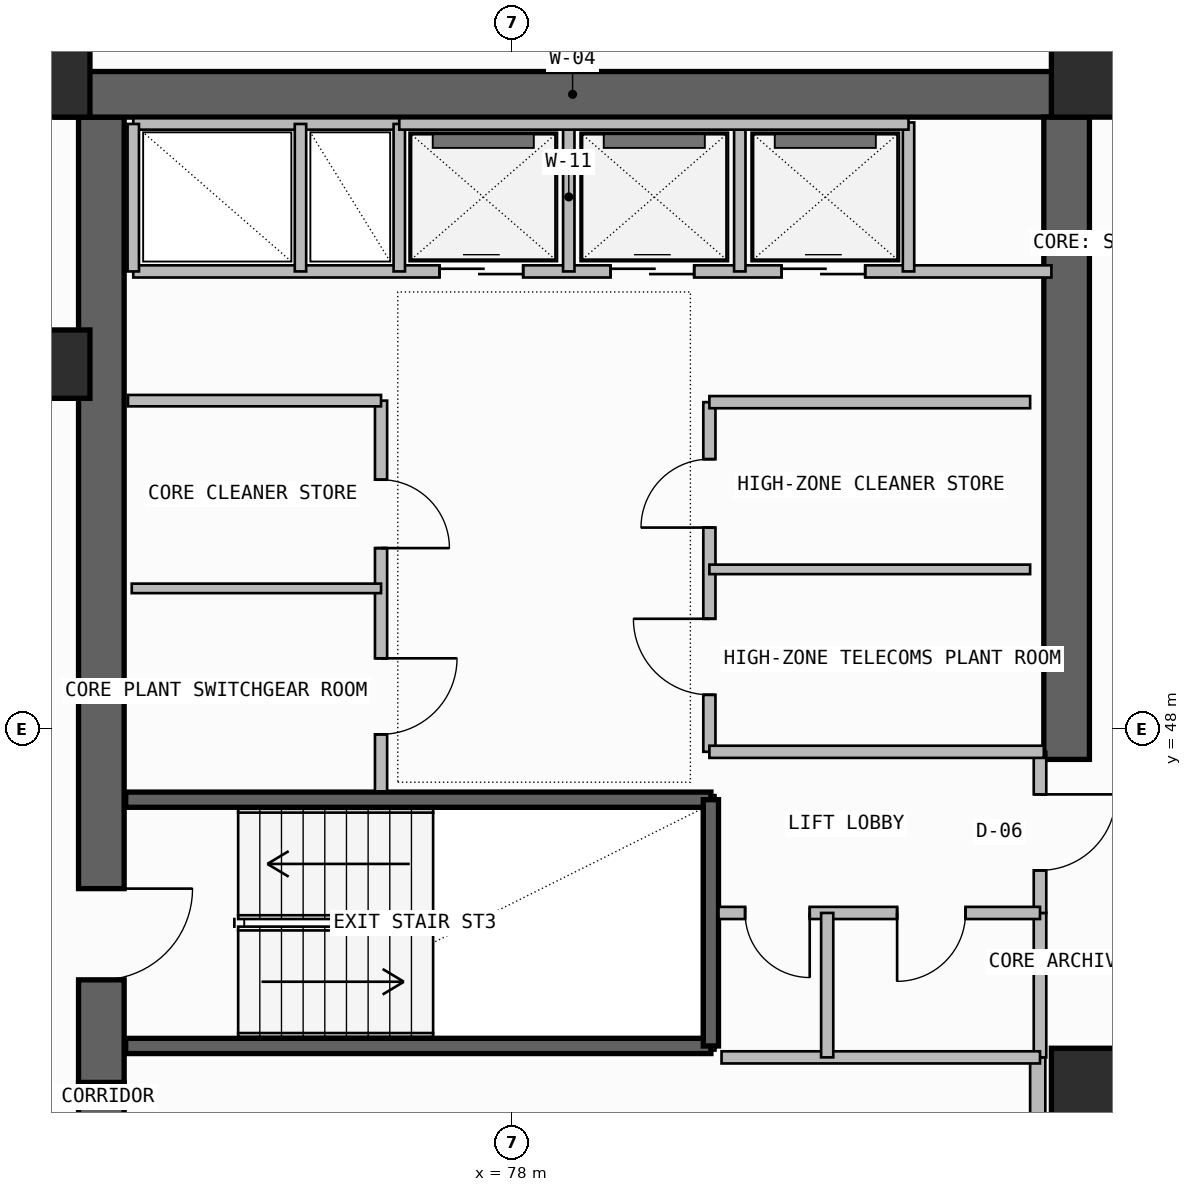
"""IFC4 building model, lengths in metres.
Left out: names, types, materials, properties, quantities, classifications, styles, units other than length and angle.
Written with IfcOpenShell. Run it as: python <this file> out.ifc"""

import sys

from ifc_helpers import new_model, si_unit, direction, frame, frame_2d, origin, origin_2d, place, context, subcontext, project, spatial, rectangle, extrude, element, fill, save


model = new_model("IFC4")
c1 = context("Model", 3, precision=1e-05, world=origin(), true_north=direction((0.0, 1.0)))
c2 = subcontext(c1, "Body", "Model", "MODEL_VIEW")
j1 = project(units=[si_unit("LENGTHUNIT", "METRE"), si_unit("PLANEANGLEUNIT", "RADIAN")], contexts=[c1])
p1 = place(None, origin())
s1 = spatial("IfcSite", under=j1, at=p1, CompositionType="ELEMENT")
p2 = place(p1, origin())
s2 = spatial("IfcBuilding", under=s1, at=p2, CompositionType="ELEMENT")
p3 = place(p2, frame((0.0, 0.0, 236.1)))
s3 = spatial("IfcBuildingStorey", under=s2, at=p3, CompositionType="ELEMENT", Elevation=236.1)
p4 = place(p3, frame((72.6, 35.5, -0.26), z_axis=(0.0, 0.0, 1.0), x_axis=(0.0, 1.0, 0.0)))
e1 = element("IfcWall", 1, at=p4, inside=s3, PredefinedType="SHEAR", context=c2, shape_type="SweptSolid", body=[
    extrude(rectangle(XDim=7.85, YDim=0.6, at=frame_2d((3.925, 0.0))), origin(), (0.0, 0.0, 1.0), 3.52),
])
p5 = place(p4, frame((1.45, 0.0, 0.26)))
e2 = element("IfcOpeningElement", 2, at=p5, cuts=e1, PredefinedType="OPENING", context=c2, shape_type="SweptSolid", body=[
    extrude(rectangle(XDim=1.2, YDim=2.2, at=frame_2d((0.6, 1.1))), frame((0.0, 0.31, 0.0), z_axis=(0.0, -1.0, 0.0), x_axis=(1.0, 0.0, 0.0)), (0.0, 0.0, 1.0), 0.62),
])
p6 = place(p3, frame((72.6, 43.35, -0.26), z_axis=(0.0, 0.0, 1.0), x_axis=(0.0, 1.0, 0.0)))
e3 = element("IfcWall", 3, at=p6, inside=s3, PredefinedType="SHEAR", context=c2, shape_type="SweptSolid", body=[
    extrude(rectangle(XDim=12.7, YDim=0.6, at=frame_2d((6.35, 0.0))), origin(), (0.0, 0.0, 1.0), 3.52),
])
p7 = place(p6, frame((1.35, 0.0, 0.26)))
e4 = element("IfcOpeningElement", 4, at=p7, cuts=e3, PredefinedType="OPENING", context=c2, shape_type="SweptSolid", body=[
    extrude(rectangle(XDim=1.2, YDim=2.2, at=frame_2d((0.6, 1.1))), frame((0.0, 0.31, 0.0), z_axis=(0.0, -1.0, 0.0), x_axis=(1.0, 0.0, 0.0)), (0.0, 0.0, 1.0), 0.62),
])
p8 = place(p3, frame((72.0, 56.35, -0.26), z_axis=(0.0, 0.0, 1.0), x_axis=(1.0, 0.0, 0.0)))
e5 = element("IfcWall", 5, at=p8, inside=s3, PredefinedType="SHEAR", context=c2, shape_type="SweptSolid", body=[
    extrude(rectangle(XDim=13.6, YDim=0.6, at=frame_2d((6.8, 0.0))), origin(), (0.0, 0.0, 1.0), 3.52),
])
p9 = place(p3, frame((85.3, 47.6, -0.26), z_axis=(0.0, 0.0, 1.0), x_axis=(0.0, 1.0, 0.0)))
e6 = element("IfcWall", 6, at=p9, inside=s3, PredefinedType="SHEAR", context=c2, shape_type="SweptSolid", body=[
    extrude(rectangle(XDim=8.45, YDim=0.6, at=frame_2d((4.225, 0.0))), origin(), (0.0, 0.0, 1.0), 3.52),
])
for number, where, z_axis, x_axis in (
    (7, (85.55, 43.35, 0.0), (0.0, 0.0, 1.0), (1.0, 0.0, 0.0)),
    (8, (72.0, 52.8, 0.0), (0.0, 0.0, 1.0), (1.0, 0.0, 0.0)),
    (9, (72.0, 56.5, 0.0), (0.0, 0.0, 1.0), (1.0, 0.0, 0.0)),
    (10, (85.55, 56.5, 0.0), (0.0, 0.0, 1.0), (1.0, 0.0, 0.0)),
):
    element("IfcColumn", number, at=place(p3, frame(where, z_axis=z_axis, x_axis=x_axis)), inside=s3, PredefinedType="COLUMN", context=c2, shape_type="SweptSolid", body=[
        extrude(rectangle(XDim=0.9, YDim=0.9, at=origin_2d()), origin(), (0.0, 0.0, 1.0), 3.52),
    ])
p10 = place(p3, frame((84.92, 38.85, 0.0), z_axis=(0.0, 0.0, 1.0), x_axis=(0.0, 1.0, 0.0)))
e11 = element("IfcWall", 11, at=p10, inside=s3, PredefinedType="SOLIDWALL", context=c2, shape_type="SweptSolid", body=[
    extrude(rectangle(XDim=4.83, YDim=0.2, at=frame_2d((2.415, 0.0))), origin(), (0.0, 0.0, 1.0), 3.26),
])
p11 = place(p10, frame((1.25, 0.0, 0.0)))
e12 = element("IfcOpeningElement", 12, at=p11, cuts=e11, PredefinedType="OPENING", context=c2, shape_type="SweptSolid", body=[
    extrude(rectangle(XDim=1.1, YDim=2.2, at=frame_2d((0.55, 1.1))), frame((0.0, 0.11, 0.0), z_axis=(0.0, -1.0, 0.0), x_axis=(1.0, 0.0, 0.0)), (0.0, 0.0, 1.0), 0.22),
])
for number, where, z_axis, x_axis in (
    (13, (72.92, 43.83, -0.26), (0.0, 0.0, 1.0), (1.0, 0.0, 0.0)),
    (14, (72.92, 47.07, -0.26), (0.0, 0.0, 1.0), (1.0, 0.0, 0.0)),
):
    element("IfcWall", number, at=place(p3, frame(where, z_axis=z_axis, x_axis=x_axis)), inside=s3, PredefinedType="SOLIDWALL", context=c2, shape_type="SweptSolid", body=[
        extrude(rectangle(XDim=7.7, YDim=0.2, at=frame_2d((3.85, 0.0))), origin(), (0.0, 0.0, 1.0), 3.52),
    ])
p12 = place(p3, frame((80.62, 43.83, -0.26), z_axis=(0.0, 0.0, 1.0), x_axis=(0.0, 1.0, 0.0)))
e15 = element("IfcWall", 15, at=p12, inside=s3, PredefinedType="SOLIDWALL", context=c2, shape_type="SweptSolid", body=[
    extrude(rectangle(XDim=3.24, YDim=0.2, at=frame_2d((1.62, 0.0))), origin(), (0.0, 0.0, 1.0), 3.52),
])
p13 = place(p3, frame((84.95, 43.68, 0.0), z_axis=(0.0, 0.0, 1.0), x_axis=(0.0, 1.0, 0.0)))
e16 = element("IfcWall", 16, at=p13, inside=s3, PredefinedType="PLUMBINGWALL", context=c2, shape_type="SweptSolid", body=[
    extrude(rectangle(XDim=1.9, YDim=0.165, at=frame_2d((0.95, 0.0))), origin(), (0.0, 0.0, 1.0), 3.26),
])
p14 = place(p3, frame((84.95, 45.58, 0.0), z_axis=(0.0, 0.0, 1.0), x_axis=(0.0, 1.0, 0.0)))
e17 = element("IfcWall", 17, at=p14, inside=s3, PredefinedType="PARTITIONING", context=c2, shape_type="SweptSolid", body=[
    extrude(rectangle(XDim=2.12, YDim=0.165, at=frame_2d((1.06, 0.0))), origin(), (0.0, 0.0, 1.0), 3.26),
])
p15 = place(p14, frame((0.56, 0.0, 0.0)))
e18 = element("IfcOpeningElement", 18, at=p15, cuts=e17, PredefinedType="OPENING", context=c2, shape_type="SweptSolid", body=[
    extrude(rectangle(XDim=1.0, YDim=2.2, at=frame_2d((0.5, 1.1))), frame((0.0, 0.093, 0.0), z_axis=(0.0, -1.0, 0.0), x_axis=(1.0, 0.0, 0.0)), (0.0, 0.0, 1.0), 0.185),
])
p16 = place(p3, frame((80.72, 45.58, 0.0), z_axis=(0.0, 0.0, 1.0), x_axis=(1.0, 0.0, 0.0)))
e19 = element("IfcWall", 19, at=p16, inside=s3, PredefinedType="PLUMBINGWALL", context=c2, shape_type="SweptSolid", body=[
    extrude(rectangle(XDim=4.23, YDim=0.16, at=frame_2d((2.115, 0.0))), origin(), (0.0, 0.0, 1.0), 3.26),
])
p17 = place(p16, frame((0.35, 0.0, 0.0)))
e20 = element("IfcOpeningElement", 20, at=p17, cuts=e19, PredefinedType="OPENING", context=c2, shape_type="SweptSolid", body=[
    extrude(rectangle(XDim=0.85, YDim=2.05, at=frame_2d((0.425, 1.025))), frame((0.0, 0.09, 0.0), z_axis=(0.0, -1.0, 0.0), x_axis=(1.0, 0.0, 0.0)), (0.0, 0.0, 1.0), 0.18),
])
p18 = place(p16, frame((2.35, 0.0, 0.0)))
e21 = element("IfcOpeningElement", 21, at=p18, cuts=e19, PredefinedType="OPENING", context=c2, shape_type="SweptSolid", body=[
    extrude(rectangle(XDim=0.9, YDim=2.1, at=frame_2d((0.45, 1.05))), frame((0.0, 0.09, 0.0), z_axis=(0.0, -1.0, 0.0), x_axis=(1.0, 0.0, 0.0)), (0.0, 0.0, 1.0), 0.18),
])
p19 = place(p3, frame((80.76, 43.68, 0.0), z_axis=(0.0, 0.0, 1.0), x_axis=(1.0, 0.0, 0.0)))
e22 = element("IfcWall", 22, at=p19, inside=s3, PredefinedType="PLUMBINGWALL", context=c2, shape_type="SweptSolid", body=[
    extrude(rectangle(XDim=4.19, YDim=0.16, at=frame_2d((2.095, 0.0))), origin(), (0.0, 0.0, 1.0), 3.26),
])
p20 = place(p3, frame((82.15, 43.68, 0.0), z_axis=(0.0, 0.0, 1.0), x_axis=(0.0, 1.0, 0.0)))
e23 = element("IfcWall", 23, at=p20, inside=s3, PredefinedType="PLUMBINGWALL", context=c2, shape_type="SweptSolid", body=[
    extrude(rectangle(XDim=1.9, YDim=0.16, at=frame_2d((0.95, 0.0))), origin(), (0.0, 0.0, 1.0), 3.26),
])
p21 = place(p3, frame((76.28, 47.18, 0.0), z_axis=(0.0, 0.0, 1.0), x_axis=(0.0, 1.0, 0.0)))
e24 = element("IfcWall", 24, at=p21, inside=s3, PredefinedType="SOLIDWALL", context=c2, shape_type="SweptSolid", body=[
    extrude(rectangle(XDim=5.14, YDim=0.16, at=frame_2d((2.57, 0.0))), origin(), (0.0, 0.0, 1.0), 3.26),
])
p22 = place(p21, frame((0.75, 0.0, 0.0)))
e25 = element("IfcOpeningElement", 25, at=p22, cuts=e24, PredefinedType="OPENING", context=c2, shape_type="SweptSolid", body=[
    extrude(rectangle(XDim=1.0, YDim=2.2, at=frame_2d((0.5, 1.1))), frame((0.0, 0.09, 0.0), z_axis=(0.0, -1.0, 0.0), x_axis=(1.0, 0.0, 0.0)), (0.0, 0.0, 1.0), 0.18),
])
p23 = place(p21, frame((3.2, 0.0, 0.0)))
e26 = element("IfcOpeningElement", 26, at=p23, cuts=e24, PredefinedType="OPENING", context=c2, shape_type="SweptSolid", body=[
    extrude(rectangle(XDim=0.9, YDim=2.1, at=frame_2d((0.45, 1.05))), frame((0.0, 0.09, 0.0), z_axis=(0.0, -1.0, 0.0), x_axis=(1.0, 0.0, 0.0)), (0.0, 0.0, 1.0), 0.18),
])
p24 = place(p3, frame((72.95, 52.32, 0.0), z_axis=(0.0, 0.0, 1.0), x_axis=(1.0, 0.0, 0.0)))
e27 = element("IfcWall", 27, at=p24, inside=s3, PredefinedType="SOLIDWALL", context=c2, shape_type="SweptSolid", body=[
    extrude(rectangle(XDim=3.33, YDim=0.15, at=frame_2d((1.665, 0.0))), origin(), (0.0, 0.0, 1.0), 3.26),
])
p25 = place(p3, frame((73.0, 49.85, 0.0), z_axis=(0.0, 0.0, 1.0), x_axis=(1.0, 0.0, 0.0)))
e28 = element("IfcWall", 28, at=p25, inside=s3, PredefinedType="PARTITIONING", context=c2, shape_type="SweptSolid", body=[
    extrude(rectangle(XDim=3.28, YDim=0.125, at=frame_2d((1.64, 0.0))), origin(), (0.0, 0.0, 1.0), 3.26),
])
p26 = place(p3, frame((80.6, 47.7, 0.0), z_axis=(0.0, 0.0, 1.0), x_axis=(0.0, 1.0, 0.0)))
e29 = element("IfcWall", 29, at=p26, inside=s3, PredefinedType="SOLIDWALL", context=c2, shape_type="SweptSolid", body=[
    extrude(rectangle(XDim=4.6, YDim=0.16, at=frame_2d((2.3, 0.0))), origin(), (0.0, 0.0, 1.0), 3.26),
])
p27 = place(p26, frame((0.75, 0.0, 0.0)))
e30 = element("IfcOpeningElement", 30, at=p27, cuts=e29, PredefinedType="OPENING", context=c2, shape_type="SweptSolid", body=[
    extrude(rectangle(XDim=1.0, YDim=2.2, at=frame_2d((0.5, 1.1))), frame((0.0, 0.09, 0.0), z_axis=(0.0, -1.0, 0.0), x_axis=(1.0, 0.0, 0.0)), (0.0, 0.0, 1.0), 0.18),
])
p28 = place(p26, frame((2.95, 0.0, 0.0)))
e31 = element("IfcOpeningElement", 31, at=p28, cuts=e29, PredefinedType="OPENING", context=c2, shape_type="SweptSolid", body=[
    extrude(rectangle(XDim=0.9, YDim=2.1, at=frame_2d((0.45, 1.05))), frame((0.0, 0.09, 0.0), z_axis=(0.0, -1.0, 0.0), x_axis=(1.0, 0.0, 0.0)), (0.0, 0.0, 1.0), 0.18),
])
p29 = place(p3, frame((80.6, 47.7, 0.0), z_axis=(0.0, 0.0, 1.0), x_axis=(1.0, 0.0, 0.0)))
e32 = element("IfcWall", 32, at=p29, inside=s3, PredefinedType="SOLIDWALL", context=c2, shape_type="SweptSolid", body=[
    extrude(rectangle(XDim=4.4, YDim=0.16, at=frame_2d((2.2, 0.0))), origin(), (0.0, 0.0, 1.0), 3.26),
])
p30 = place(p3, frame((80.6, 52.3, 0.0), z_axis=(0.0, 0.0, 1.0), x_axis=(1.0, 0.0, 0.0)))
e33 = element("IfcWall", 33, at=p30, inside=s3, PredefinedType="SOLIDWALL", context=c2, shape_type="SweptSolid", body=[
    extrude(rectangle(XDim=4.22, YDim=0.16, at=frame_2d((2.11, 0.0))), origin(), (0.0, 0.0, 1.0), 3.26),
])
p31 = place(p3, frame((80.6, 50.1, 0.0), z_axis=(0.0, 0.0, 1.0), x_axis=(1.0, 0.0, 0.0)))
e34 = element("IfcWall", 34, at=p31, inside=s3, PredefinedType="PARTITIONING", context=c2, shape_type="SweptSolid", body=[
    extrude(rectangle(XDim=4.22, YDim=0.125, at=frame_2d((2.11, 0.0))), origin(), (0.0, 0.0, 1.0), 3.26),
])
p32 = place(p3, frame((73.02, 54.02, 0.0), z_axis=(0.0, 0.0, 1.0), x_axis=(1.0, 0.0, 0.0)))
e35 = element("IfcWall", 35, at=p32, inside=s3, PredefinedType="SOLIDWALL", context=c2, shape_type="SweptSolid", body=[
    extrude(rectangle(XDim=12.08, YDim=0.16, at=frame_2d((6.04, 0.0))), origin(), (0.0, 0.0, 1.0), 3.26),
])
p33 = place(p32, frame((4.03, 0.0, 0.0)))
e36 = element("IfcOpeningElement", 36, at=p33, cuts=e35, PredefinedType="OPENING", context=c2, shape_type="SweptSolid", body=[
    extrude(rectangle(XDim=1.1, YDim=2.25, at=frame_2d((0.55, 1.125))), frame((0.0, 0.09, 0.0), z_axis=(0.0, -1.0, 0.0), x_axis=(1.0, 0.0, 0.0)), (0.0, 0.0, 1.0), 0.18),
])
p34 = place(p32, frame((6.28, 0.0, 0.0)))
e37 = element("IfcOpeningElement", 37, at=p34, cuts=e35, PredefinedType="OPENING", context=c2, shape_type="SweptSolid", body=[
    extrude(rectangle(XDim=1.1, YDim=2.25, at=frame_2d((0.55, 1.125))), frame((0.0, 0.09, 0.0), z_axis=(0.0, -1.0, 0.0), x_axis=(1.0, 0.0, 0.0)), (0.0, 0.0, 1.0), 0.18),
])
p35 = place(p32, frame((8.53, 0.0, 0.0)))
e38 = element("IfcOpeningElement", 38, at=p35, cuts=e35, PredefinedType="OPENING", context=c2, shape_type="SweptSolid", body=[
    extrude(rectangle(XDim=1.1, YDim=2.25, at=frame_2d((0.55, 1.125))), frame((0.0, 0.09, 0.0), z_axis=(0.0, -1.0, 0.0), x_axis=(1.0, 0.0, 0.0)), (0.0, 0.0, 1.0), 0.18),
])
p36 = place(p3, frame((73.02, 55.96, 0.0), z_axis=(0.0, 0.0, 1.0), x_axis=(1.0, 0.0, 0.0)))
e39 = element("IfcWall", 39, at=p36, inside=s3, PredefinedType="SOLIDWALL", context=c2, shape_type="SweptSolid", body=[
    extrude(rectangle(XDim=3.5, YDim=0.15, at=frame_2d((1.75, 0.0))), origin(), (0.0, 0.0, 1.0), 3.26),
])
p37 = place(p3, frame((73.02, 54.02, 0.0), z_axis=(0.0, 0.0, 1.0), x_axis=(0.0, 1.0, 0.0)))
e40 = element("IfcWall", 40, at=p37, inside=s3, PredefinedType="PLUMBINGWALL", context=c2, shape_type="SweptSolid", body=[
    extrude(rectangle(XDim=1.94, YDim=0.15, at=frame_2d((0.97, 0.0))), origin(), (0.0, 0.0, 1.0), 3.26),
])
p38 = place(p3, frame((76.52, 54.02, 0.0), z_axis=(0.0, 0.0, 1.0), x_axis=(0.0, 1.0, 0.0)))
e41 = element("IfcWall", 41, at=p38, inside=s3, PredefinedType="SOLIDWALL", context=c2, shape_type="SweptSolid", body=[
    extrude(rectangle(XDim=1.94, YDim=0.15, at=frame_2d((0.97, 0.0))), origin(), (0.0, 0.0, 1.0), 3.26),
])
p39 = place(p3, frame((75.22, 54.02, 0.0), z_axis=(0.0, 0.0, 1.0), x_axis=(0.0, 1.0, 0.0)))
e42 = element("IfcWall", 42, at=p39, inside=s3, PredefinedType="PLUMBINGWALL", context=c2, shape_type="SweptSolid", body=[
    extrude(rectangle(XDim=1.94, YDim=0.15, at=frame_2d((0.97, 0.0))), origin(), (0.0, 0.0, 1.0), 3.26),
])
for number, where, z_axis, x_axis in (
    (43, (78.75, 54.02, 0.0), (0.0, 0.0, 1.0), (0.0, 1.0, 0.0)),
    (44, (81.0, 54.02, 0.0), (0.0, 0.0, 1.0), (0.0, 1.0, 0.0)),
):
    element("IfcWall", number, at=place(p3, frame(where, z_axis=z_axis, x_axis=x_axis)), inside=s3, PredefinedType="PLUMBINGWALL", context=c2, shape_type="SweptSolid", body=[
        extrude(rectangle(XDim=1.96, YDim=0.15, at=frame_2d((0.98, 0.0))), origin(), (0.0, 0.0, 1.0), 3.26),
    ])
p40 = place(p3, frame((83.22, 54.02, 0.0), z_axis=(0.0, 0.0, 1.0), x_axis=(0.0, 1.0, 0.0)))
e45 = element("IfcWall", 45, at=p40, inside=s3, PredefinedType="SOLIDWALL", context=c2, shape_type="SweptSolid", body=[
    extrude(rectangle(XDim=1.96, YDim=0.15, at=frame_2d((0.98, 0.0))), origin(), (0.0, 0.0, 1.0), 3.26),
])
p41 = place(p3, frame((76.52, 55.96, 0.0), z_axis=(0.0, 0.0, 1.0), x_axis=(1.0, 0.0, 0.0)))
e46 = element("IfcWall", 46, at=p41, inside=s3, PredefinedType="SOLIDWALL", context=c2, shape_type="SweptSolid", body=[
    extrude(rectangle(XDim=6.7, YDim=0.15, at=frame_2d((3.35, 0.0))), origin(), (0.0, 0.0, 1.0), 3.26),
])
p42 = place(p7, frame((1.2, 0.0, 0.0), z_axis=(0.0, 0.0, 1.0), x_axis=(-1.0, 0.0, 0.0)))
e47 = element("IfcDoor", 47, at=p42, inside=s3, OperationType="SINGLE_SWING_LEFT", PredefinedType="USERDEFINED", context=c2, shape_type="SweptSolid", body=[
    extrude(rectangle(XDim=1.2, YDim=2.2, at=frame_2d((0.6, 1.1))), frame((0.0, 0.025, 0.0), z_axis=(0.0, -1.0, 0.0), x_axis=(1.0, 0.0, 0.0)), (0.0, 0.0, 1.0), 0.05),
])
fill(e4, e47)
p43 = place(p15, frame((1.0, 0.0, 0.0), z_axis=(0.0, 0.0, 1.0), x_axis=(-1.0, 0.0, 0.0)))
e48 = element("IfcDoor", 48, at=p43, inside=s3, OperationType="SINGLE_SWING_LEFT", PredefinedType="DOOR", context=c2, shape_type="SweptSolid", body=[
    extrude(rectangle(XDim=1.0, YDim=2.2, at=frame_2d((0.5, 1.1))), frame((0.0, 0.025, 0.0), z_axis=(0.0, -1.0, 0.0), x_axis=(1.0, 0.0, 0.0)), (0.0, 0.0, 1.0), 0.05),
])
fill(e18, e48)
p44 = place(p17, frame((0.85, 0.0, 0.0), z_axis=(0.0, 0.0, 1.0), x_axis=(-1.0, 0.0, 0.0)))
e49 = element("IfcDoor", 49, at=p44, inside=s3, OperationType="SINGLE_SWING_LEFT", PredefinedType="DOOR", context=c2, shape_type="SweptSolid", body=[
    extrude(rectangle(XDim=0.85, YDim=2.05, at=frame_2d((0.425, 1.025))), frame((0.0, 0.025, 0.0), z_axis=(0.0, -1.0, 0.0), x_axis=(1.0, 0.0, 0.0)), (0.0, 0.0, 1.0), 0.05),
])
fill(e20, e49)
p45 = place(p18, frame((0.9, 0.0, 0.0), z_axis=(0.0, 0.0, 1.0), x_axis=(-1.0, 0.0, 0.0)))
e50 = element("IfcDoor", 50, at=p45, inside=s3, OperationType="SINGLE_SWING_RIGHT", PredefinedType="DOOR", context=c2, shape_type="SweptSolid", body=[
    extrude(rectangle(XDim=0.9, YDim=2.1, at=frame_2d((0.45, 1.05))), frame((0.0, 0.025, 0.0), z_axis=(0.0, -1.0, 0.0), x_axis=(1.0, 0.0, 0.0)), (0.0, 0.0, 1.0), 0.05),
])
fill(e21, e50)
p46 = place(p22, frame((1.0, 0.0, 0.0), z_axis=(0.0, 0.0, 1.0), x_axis=(-1.0, 0.0, 0.0)))
e51 = element("IfcDoor", 51, at=p46, inside=s3, OperationType="SINGLE_SWING_LEFT", PredefinedType="DOOR", context=c2, shape_type="SweptSolid", body=[
    extrude(rectangle(XDim=1.0, YDim=2.2, at=frame_2d((0.5, 1.1))), frame((0.0, 0.025, 0.0), z_axis=(0.0, -1.0, 0.0), x_axis=(1.0, 0.0, 0.0)), (0.0, 0.0, 1.0), 0.05),
])
fill(e25, e51)
p47 = place(p23, frame((0.9, 0.0, 0.0), z_axis=(0.0, 0.0, 1.0), x_axis=(-1.0, 0.0, 0.0)))
e52 = element("IfcDoor", 52, at=p47, inside=s3, OperationType="SINGLE_SWING_RIGHT", PredefinedType="DOOR", context=c2, shape_type="SweptSolid", body=[
    extrude(rectangle(XDim=0.9, YDim=2.1, at=frame_2d((0.45, 1.05))), frame((0.0, 0.025, 0.0), z_axis=(0.0, -1.0, 0.0), x_axis=(1.0, 0.0, 0.0)), (0.0, 0.0, 1.0), 0.05),
])
fill(e26, e52)
p48 = place(p27, origin())
e53 = element("IfcDoor", 53, at=p48, inside=s3, OperationType="SINGLE_SWING_RIGHT", PredefinedType="DOOR", context=c2, shape_type="SweptSolid", body=[
    extrude(rectangle(XDim=1.0, YDim=2.2, at=frame_2d((0.5, 1.1))), frame((0.0, 0.025, 0.0), z_axis=(0.0, -1.0, 0.0), x_axis=(1.0, 0.0, 0.0)), (0.0, 0.0, 1.0), 0.05),
])
fill(e30, e53)
p49 = place(p28, origin())
e54 = element("IfcDoor", 54, at=p49, inside=s3, OperationType="SINGLE_SWING_LEFT", PredefinedType="DOOR", context=c2, shape_type="SweptSolid", body=[
    extrude(rectangle(XDim=0.9, YDim=2.1, at=frame_2d((0.45, 1.05))), frame((0.0, 0.025, 0.0), z_axis=(0.0, -1.0, 0.0), x_axis=(1.0, 0.0, 0.0)), (0.0, 0.0, 1.0), 0.05),
])
fill(e31, e54)
p50 = place(p33, origin())
e55 = element("IfcDoor", 55, at=p50, inside=s3, OperationType="DOUBLE_DOOR_SLIDING", PredefinedType="DOOR", context=c2, shape_type="SweptSolid", body=[
    extrude(rectangle(XDim=1.1, YDim=2.25, at=frame_2d((0.55, 1.125))), frame((0.0, 0.025, 0.0), z_axis=(0.0, -1.0, 0.0), x_axis=(1.0, 0.0, 0.0)), (0.0, 0.0, 1.0), 0.05),
])
fill(e36, e55)
p51 = place(p34, origin())
e56 = element("IfcDoor", 56, at=p51, inside=s3, OperationType="DOUBLE_DOOR_SLIDING", PredefinedType="DOOR", context=c2, shape_type="SweptSolid", body=[
    extrude(rectangle(XDim=1.1, YDim=2.25, at=frame_2d((0.55, 1.125))), frame((0.0, 0.025, 0.0), z_axis=(0.0, -1.0, 0.0), x_axis=(1.0, 0.0, 0.0)), (0.0, 0.0, 1.0), 0.05),
])
fill(e37, e56)
p52 = place(p35, origin())
e57 = element("IfcDoor", 57, at=p52, inside=s3, OperationType="DOUBLE_DOOR_SLIDING", PredefinedType="DOOR", context=c2, shape_type="SweptSolid", body=[
    extrude(rectangle(XDim=1.1, YDim=2.25, at=frame_2d((0.55, 1.125))), frame((0.0, 0.025, 0.0), z_axis=(0.0, -1.0, 0.0), x_axis=(1.0, 0.0, 0.0)), (0.0, 0.0, 1.0), 0.05),
])
fill(e38, e57)
save(model, sys.argv[1])
